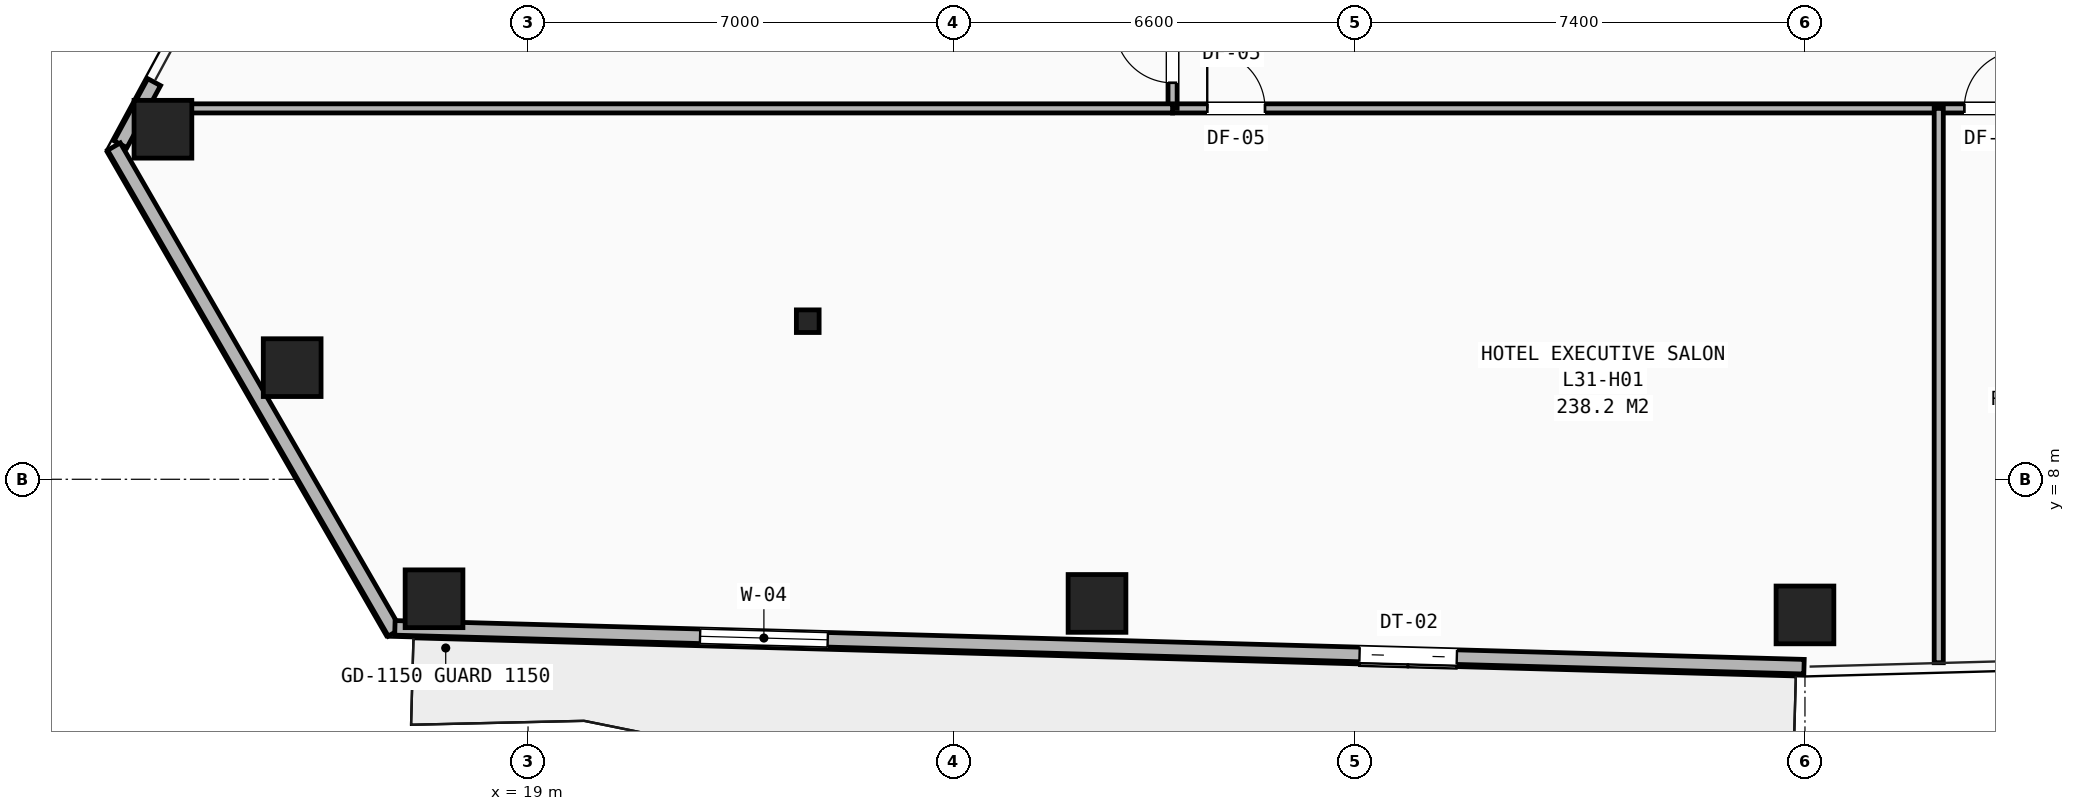
"""IFC4 building model, lengths in metres.
Left out: names, types, materials, properties, quantities, classifications, styles, units other than length and angle.
Written with IfcOpenShell. Run it as: python <this file> out.ifc"""

import sys

from ifc_helpers import new_model, si_unit, direction, frame, frame_2d, origin, origin_2d, place, context, subcontext, project, spatial, rectangle, hollow_rectangle, i_section, extrude, element, fill, save


model = new_model("IFC4")
c1 = context("Model", 3, precision=1e-05, world=origin(), true_north=direction((0.0, 1.0)))
c2 = subcontext(c1, "Body", "Model", "MODEL_VIEW")
j1 = project(units=[si_unit("LENGTHUNIT", "METRE"), si_unit("PLANEANGLEUNIT", "RADIAN")], contexts=[c1])
p1 = place(None, origin())
s1 = spatial("IfcSite", under=j1, at=p1, CompositionType="ELEMENT")
p2 = place(p1, origin())
s2 = spatial("IfcBuilding", under=s1, at=p2, CompositionType="ELEMENT")
p3 = place(p2, frame((0.0, 0.0, 108.6)))
s3 = spatial("IfcBuildingStorey", under=s2, at=p3, CompositionType="ELEMENT", Elevation=108.6)
p4 = place(p3, frame((23.6, 10.6, 0.0), z_axis=(0.0, 0.0, 1.0), x_axis=(1.0, 0.0, 0.0)))
e1 = element("IfcColumn", 1, at=p4, inside=s3, PredefinedType="COLUMN", context=c2, shape_type="SweptSolid", body=[
    extrude(i_section(OverallWidth=0.374, OverallDepth=0.372, WebThickness=0.016, FlangeThickness=0.026, at=origin_2d()), origin(), (0.0, 0.0, 1.0), 3.2),
])
for number, where, z_axis, x_axis in (
    (2, (12.996, 13.757, 0.0), (0.0, 0.0, 1.0), (1.0, 0.0, 0.0)),
    (3, (15.121, 9.836, 0.0), (0.0, 0.0, 1.0), (1.0, 0.0, 0.0)),
    (4, (17.454, 6.035, 0.0), (0.0, 0.0, 1.0), (1.0, 0.0, 0.0)),
    (5, (28.357, 5.958, 0.0), (0.0, 0.0, 1.0), (1.0, 0.0, 0.0)),
    (6, (40.0, 5.769, 0.0), (0.0, 0.0, 1.0), (1.0, 0.0, 0.0)),
):
    element("IfcColumn", number, at=place(p3, frame(where, z_axis=z_axis, x_axis=x_axis)), inside=s3, PredefinedType="COLUMN", context=c2, shape_type="SweptSolid", body=[
        extrude(hollow_rectangle(XDim=0.95, YDim=0.95, WallThickness=0.065, at=origin_2d()), origin(), (0.0, 0.0, 1.0), 3.2),
    ])
p5 = place(p3, frame((12.85, 14.532, 0.0), z_axis=(0.0, 0.0, 1.0), x_axis=(-0.475877177097, -0.879511746549, 0.0)))
e7 = element("IfcWall", 7, at=p5, inside=s3, PredefinedType="SHEAR", context=c2, shape_type="SweptSolid", body=[
    extrude(rectangle(XDim=1.163, YDim=0.24, at=frame_2d((0.581, 0.0))), origin(), (0.0, 0.0, 1.0), 2.223),
])
p6 = place(p3, frame((16.805, 5.48, 0.0), z_axis=(0.0, 0.0, 1.0), x_axis=(-0.500017094579, 0.866015534, 0.0)))
e8 = element("IfcWall", 8, at=p6, inside=s3, PredefinedType="SHEAR", context=c2, shape_type="SweptSolid", body=[
    extrude(rectangle(XDim=9.229, YDim=0.24, at=frame_2d((4.614, 0.0))), origin(), (0.0, 0.0, 1.0), 2.223),
])
p7 = place(p3, frame((39.984, 4.917, 0.0), z_axis=(0.0, 0.0, 1.0), x_axis=(-0.99962044601, 0.027549299805, 0.0)))
e9 = element("IfcWall", 9, at=p7, inside=s3, PredefinedType="SHEAR", context=c2, shape_type="SweptSolid", body=[
    extrude(rectangle(XDim=23.183, YDim=0.24, at=frame_2d((11.591, 0.0))), origin(), (0.0, 0.0, 1.0), 2.223),
])
p8 = place(p7, frame((5.712, 0.0, 0.0)))
e10 = element("IfcOpeningElement", 10, at=p8, cuts=e9, PredefinedType="OPENING", context=c2, shape_type="SweptSolid", body=[
    extrude(rectangle(XDim=1.6, YDim=2.04, at=frame_2d((0.8, 1.02))), frame((0.0, 0.13, 0.0), z_axis=(0.0, -1.0, 0.0), x_axis=(1.0, 0.0, 0.0)), (0.0, 0.0, 1.0), 0.26),
])
p9 = place(p7, frame((16.062, 0.0, 0.25)))
e11 = element("IfcOpeningElement", 11, at=p9, cuts=e9, PredefinedType="OPENING", context=c2, shape_type="SweptSolid", body=[
    extrude(rectangle(XDim=2.1, YDim=1.7, at=frame_2d((1.05, 0.85))), frame((0.0, 0.13, 0.0), z_axis=(0.0, -1.0, 0.0), x_axis=(1.0, 0.0, 0.0)), (0.0, 0.0, 1.0), 0.26),
])
p10 = place(p3, frame((29.6, 14.1, 0.0), z_axis=(0.0, 0.0, 1.0), x_axis=(1.0, 0.0, 0.0)))
e12 = element("IfcWall", 12, at=p10, inside=s3, PredefinedType="PARTITIONING", context=c2, shape_type="SweptSolid", body=[
    extrude(rectangle(XDim=20.8, YDim=0.15, at=frame_2d((10.4, 0.0))), origin(), (0.0, 0.0, 1.0), 2.151),
])
p11 = place(p10, frame((0.57, 0.0, 0.0)))
e13 = element("IfcOpeningElement", 13, at=p11, cuts=e12, PredefinedType="OPENING", context=c2, shape_type="SweptSolid", body=[
    extrude(rectangle(XDim=0.95, YDim=2.1, at=frame_2d((0.475, 1.05))), frame((0.0, 0.085, 0.0), z_axis=(0.0, -1.0, 0.0), x_axis=(1.0, 0.0, 0.0)), (0.0, 0.0, 1.0), 0.17),
])
p12 = place(p10, frame((13.02, 0.0, 0.0)))
e14 = element("IfcOpeningElement", 14, at=p12, cuts=e12, PredefinedType="OPENING", context=c2, shape_type="SweptSolid", body=[
    extrude(rectangle(XDim=0.95, YDim=2.1, at=frame_2d((0.475, 1.05))), frame((0.0, 0.085, 0.0), z_axis=(0.0, -1.0, 0.0), x_axis=(1.0, 0.0, 0.0)), (0.0, 0.0, 1.0), 0.17),
])
p13 = place(p10, frame((17.42, 0.0, 0.0)))
e15 = element("IfcOpeningElement", 15, at=p13, cuts=e12, PredefinedType="OPENING", context=c2, shape_type="SweptSolid", body=[
    extrude(rectangle(XDim=0.95, YDim=2.1, at=frame_2d((0.475, 1.05))), frame((0.0, 0.085, 0.0), z_axis=(0.0, -1.0, 0.0), x_axis=(1.0, 0.0, 0.0)), (0.0, 0.0, 1.0), 0.17),
])
p14 = place(p3, frame((29.6, 14.1, 0.0), z_axis=(0.0, 0.0, 1.0), x_axis=(0.0, 1.0, 0.0)))
e16 = element("IfcWall", 16, at=p14, inside=s3, PredefinedType="PARTITIONING", context=c2, shape_type="SweptSolid", body=[
    extrude(rectangle(XDim=21.9, YDim=0.15, at=frame_2d((10.95, 0.0))), origin(), (0.0, 0.0, 1.0), 2.151),
])
p15 = place(p14, frame((0.42, 0.0, 0.0)))
e17 = element("IfcOpeningElement", 17, at=p15, cuts=e16, PredefinedType="OPENING", context=c2, shape_type="SweptSolid", body=[
    extrude(rectangle(XDim=0.95, YDim=2.1, at=frame_2d((0.475, 1.05))), frame((0.0, 0.085, 0.0), z_axis=(0.0, -1.0, 0.0), x_axis=(1.0, 0.0, 0.0)), (0.0, 0.0, 1.0), 0.17),
])
p16 = place(p14, frame((5.12, 0.0, 0.0)))
e18 = element("IfcOpeningElement", 18, at=p16, cuts=e16, PredefinedType="OPENING", context=c2, shape_type="SweptSolid", body=[
    extrude(rectangle(XDim=0.95, YDim=2.1, at=frame_2d((0.475, 1.05))), frame((0.0, 0.085, 0.0), z_axis=(0.0, -1.0, 0.0), x_axis=(1.0, 0.0, 0.0)), (0.0, 0.0, 1.0), 0.17),
])
p17 = place(p14, frame((10.32, 0.0, 0.0)))
e19 = element("IfcOpeningElement", 19, at=p17, cuts=e16, PredefinedType="OPENING", context=c2, shape_type="SweptSolid", body=[
    extrude(rectangle(XDim=0.95, YDim=2.1, at=frame_2d((0.475, 1.05))), frame((0.0, 0.085, 0.0), z_axis=(0.0, -1.0, 0.0), x_axis=(1.0, 0.0, 0.0)), (0.0, 0.0, 1.0), 0.17),
])
p18 = place(p14, frame((16.12, 0.0, 0.0)))
e20 = element("IfcOpeningElement", 20, at=p18, cuts=e16, PredefinedType="OPENING", context=c2, shape_type="SweptSolid", body=[
    extrude(rectangle(XDim=0.95, YDim=2.1, at=frame_2d((0.475, 1.05))), frame((0.0, 0.085, 0.0), z_axis=(0.0, -1.0, 0.0), x_axis=(1.0, 0.0, 0.0)), (0.0, 0.0, 1.0), 0.17),
])
p19 = place(p3, frame((42.2, 4.983, 0.0), z_axis=(0.0, 0.0, 1.0), x_axis=(0.0, 1.0, 0.0)))
e21 = element("IfcWall", 21, at=p19, inside=s3, PredefinedType="PARTITIONING", context=c2, shape_type="SweptSolid", body=[
    extrude(rectangle(XDim=9.117, YDim=0.15, at=frame_2d((4.559, 0.0))), origin(), (0.0, 0.0, 1.0), 2.228),
])
p20 = place(p3, frame((12.622, 14.1, 0.0), z_axis=(0.0, 0.0, 1.0), x_axis=(1.0, 0.0, 0.0)))
e22 = element("IfcWall", 22, at=p20, inside=s3, PredefinedType="PARTITIONING", context=c2, shape_type="SweptSolid", body=[
    extrude(rectangle(XDim=16.978, YDim=0.15, at=frame_2d((8.489, 0.0))), origin(), (0.0, 0.0, 1.0), 2.151),
])
p21 = place(p8, origin())
e23 = element("IfcDoor", 23, at=p21, inside=s3, OperationType="SINGLE_SWING_LEFT", PredefinedType="DOOR", context=c2, shape_type="SweptSolid", body=[
    extrude(rectangle(XDim=1.6, YDim=2.04, at=frame_2d((0.8, 1.02))), frame((0.0, 0.025, 0.0), z_axis=(0.0, -1.0, 0.0), x_axis=(1.0, 0.0, 0.0)), (0.0, 0.0, 1.0), 0.05),
])
fill(e10, e23)
p22 = place(p9, origin())
e24 = element("IfcWindow", 24, at=p22, inside=s3, PartitioningType="SINGLE_PANEL", PredefinedType="WINDOW", context=c2, shape_type="SweptSolid", body=[
    extrude(rectangle(XDim=2.1, YDim=1.7, at=frame_2d((1.05, 0.85))), frame((0.0, 0.03, 0.0), z_axis=(0.0, -1.0, 0.0), x_axis=(1.0, 0.0, 0.0)), (0.0, 0.0, 1.0), 0.06),
])
fill(e11, e24)
p23 = place(p11, origin())
e25 = element("IfcDoor", 25, at=p23, inside=s3, OperationType="SINGLE_SWING_LEFT", PredefinedType="DOOR", context=c2, shape_type="SweptSolid", body=[
    extrude(rectangle(XDim=0.95, YDim=2.1, at=frame_2d((0.475, 1.05))), frame((0.0, 0.025, 0.0), z_axis=(0.0, -1.0, 0.0), x_axis=(1.0, 0.0, 0.0)), (0.0, 0.0, 1.0), 0.05),
])
fill(e13, e25)
p24 = place(p12, origin())
e26 = element("IfcDoor", 26, at=p24, inside=s3, OperationType="SINGLE_SWING_RIGHT", PredefinedType="DOOR", context=c2, shape_type="SweptSolid", body=[
    extrude(rectangle(XDim=0.95, YDim=2.1, at=frame_2d((0.475, 1.05))), frame((0.0, 0.025, 0.0), z_axis=(0.0, -1.0, 0.0), x_axis=(1.0, 0.0, 0.0)), (0.0, 0.0, 1.0), 0.05),
])
fill(e14, e26)
p25 = place(p15, origin())
e27 = element("IfcDoor", 27, at=p25, inside=s3, OperationType="SINGLE_SWING_RIGHT", PredefinedType="DOOR", context=c2, shape_type="SweptSolid", body=[
    extrude(rectangle(XDim=0.95, YDim=2.1, at=frame_2d((0.475, 1.05))), frame((0.0, 0.025, 0.0), z_axis=(0.0, -1.0, 0.0), x_axis=(1.0, 0.0, 0.0)), (0.0, 0.0, 1.0), 0.05),
])
fill(e17, e27)
save(model, sys.argv[1])
